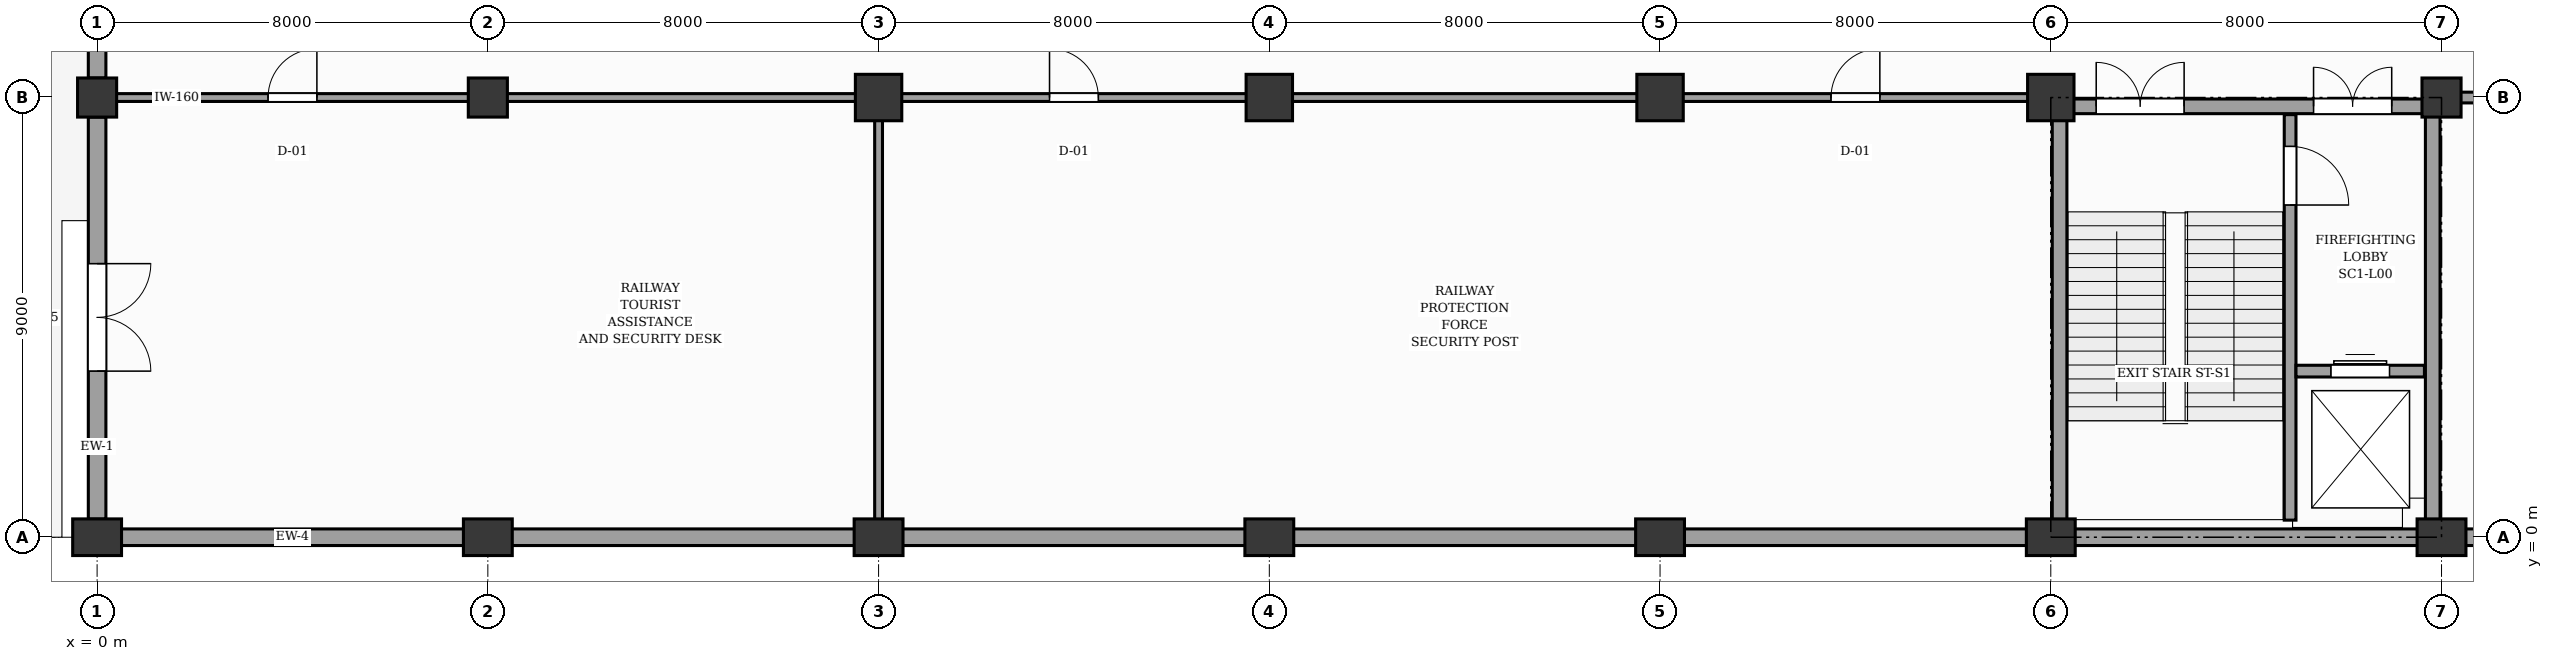
"""IFC4 building model, lengths in metres.
Left out: names, types, materials, properties, quantities, classifications, styles, units other than length and angle.
Written with IfcOpenShell. Run it as: python <this file> out.ifc"""

import sys

from ifc_helpers import new_model, si_unit, direction, frame, frame_2d, origin, origin_2d, place, context, subcontext, project, spatial, rectangle, extrude, element, fill, save


model = new_model("IFC4")
c1 = context("Model", 3, precision=1e-05, world=origin(), true_north=direction((0.0, 1.0)))
c2 = subcontext(c1, "Body", "Model", "MODEL_VIEW")
j1 = project(units=[si_unit("LENGTHUNIT", "METRE"), si_unit("PLANEANGLEUNIT", "RADIAN")], contexts=[c1])
p1 = place(None, origin())
s1 = spatial("IfcSite", under=j1, at=p1, CompositionType="ELEMENT")
p2 = place(p1, origin())
s2 = spatial("IfcBuilding", under=s1, at=p2, CompositionType="ELEMENT")
p3 = place(p2, origin())
s3 = spatial("IfcBuildingStorey", under=s2, at=p3, CompositionType="ELEMENT", Elevation=0.0)
p4 = place(p3, frame((0.0, 0.0, -0.3), z_axis=(0.0, 0.0, 1.0), x_axis=(1.0, 0.0, 0.0)))
e1 = element("IfcColumn", 1, at=p4, inside=s3, PredefinedType="PILASTER", context=c2, shape_type="SweptSolid", body=[
    extrude(rectangle(XDim=1.0, YDim=0.75, at=origin_2d()), origin(), (0.0, 0.0, 1.0), 5.1),
])
p5 = place(p3, frame((0.0, 9.0, -0.3), z_axis=(0.0, 0.0, 1.0), x_axis=(1.0, 0.0, 0.0)))
e2 = element("IfcColumn", 2, at=p5, inside=s3, PredefinedType="COLUMN", context=c2, shape_type="SweptSolid", body=[
    extrude(rectangle(XDim=0.8, YDim=0.8, at=origin_2d()), origin(), (0.0, 0.0, 1.0), 5.1),
])
p6 = place(p3, frame((8.0, 0.0, -0.3), z_axis=(0.0, 0.0, 1.0), x_axis=(1.0, 0.0, 0.0)))
e3 = element("IfcColumn", 3, at=p6, inside=s3, PredefinedType="PILASTER", context=c2, shape_type="SweptSolid", body=[
    extrude(rectangle(XDim=1.0, YDim=0.75, at=origin_2d()), origin(), (0.0, 0.0, 1.0), 5.1),
])
p7 = place(p3, frame((8.0, 9.0, -0.3), z_axis=(0.0, 0.0, 1.0), x_axis=(1.0, 0.0, 0.0)))
e4 = element("IfcColumn", 4, at=p7, inside=s3, PredefinedType="COLUMN", context=c2, shape_type="SweptSolid", body=[
    extrude(rectangle(XDim=0.8, YDim=0.8, at=origin_2d()), origin(), (0.0, 0.0, 1.0), 5.1),
])
p8 = place(p3, frame((16.0, 0.0, -0.3), z_axis=(0.0, 0.0, 1.0), x_axis=(1.0, 0.0, 0.0)))
e5 = element("IfcColumn", 5, at=p8, inside=s3, PredefinedType="PILASTER", context=c2, shape_type="SweptSolid", body=[
    extrude(rectangle(XDim=1.0, YDim=0.75, at=origin_2d()), origin(), (0.0, 0.0, 1.0), 5.1),
])
p9 = place(p3, frame((16.0, 9.0, -0.3), z_axis=(0.0, 0.0, 1.0), x_axis=(1.0, 0.0, 0.0)))
e6 = element("IfcColumn", 6, at=p9, inside=s3, PredefinedType="COLUMN", context=c2, shape_type="SweptSolid", body=[
    extrude(rectangle(XDim=0.95, YDim=0.95, at=origin_2d()), origin(), (0.0, 0.0, 1.0), 5.1),
])
p10 = place(p3, frame((24.0, 0.0, -0.3), z_axis=(0.0, 0.0, 1.0), x_axis=(1.0, 0.0, 0.0)))
e7 = element("IfcColumn", 7, at=p10, inside=s3, PredefinedType="PILASTER", context=c2, shape_type="SweptSolid", body=[
    extrude(rectangle(XDim=1.0, YDim=0.75, at=origin_2d()), origin(), (0.0, 0.0, 1.0), 5.1),
])
p11 = place(p3, frame((24.0, 9.0, -0.3), z_axis=(0.0, 0.0, 1.0), x_axis=(1.0, 0.0, 0.0)))
e8 = element("IfcColumn", 8, at=p11, inside=s3, PredefinedType="COLUMN", context=c2, shape_type="SweptSolid", body=[
    extrude(rectangle(XDim=0.95, YDim=0.95, at=origin_2d()), origin(), (0.0, 0.0, 1.0), 5.1),
])
p12 = place(p3, frame((32.0, 0.0, -0.3), z_axis=(0.0, 0.0, 1.0), x_axis=(1.0, 0.0, 0.0)))
e9 = element("IfcColumn", 9, at=p12, inside=s3, PredefinedType="PILASTER", context=c2, shape_type="SweptSolid", body=[
    extrude(rectangle(XDim=1.0, YDim=0.75, at=origin_2d()), origin(), (0.0, 0.0, 1.0), 5.1),
])
p13 = place(p3, frame((32.0, 9.0, -0.3), z_axis=(0.0, 0.0, 1.0), x_axis=(1.0, 0.0, 0.0)))
e10 = element("IfcColumn", 10, at=p13, inside=s3, PredefinedType="COLUMN", context=c2, shape_type="SweptSolid", body=[
    extrude(rectangle(XDim=0.95, YDim=0.95, at=origin_2d()), origin(), (0.0, 0.0, 1.0), 5.1),
])
p14 = place(p3, frame((40.0, 0.0, -0.3), z_axis=(0.0, 0.0, 1.0), x_axis=(1.0, 0.0, 0.0)))
e11 = element("IfcColumn", 11, at=p14, inside=s3, PredefinedType="PILASTER", context=c2, shape_type="SweptSolid", body=[
    extrude(rectangle(XDim=1.0, YDim=0.75, at=origin_2d()), origin(), (0.0, 0.0, 1.0), 5.1),
])
p15 = place(p3, frame((40.0, 9.0, -0.3), z_axis=(0.0, 0.0, 1.0), x_axis=(1.0, 0.0, 0.0)))
e12 = element("IfcColumn", 12, at=p15, inside=s3, PredefinedType="COLUMN", context=c2, shape_type="SweptSolid", body=[
    extrude(rectangle(XDim=0.95, YDim=0.95, at=origin_2d()), origin(), (0.0, 0.0, 1.0), 5.1),
])
p16 = place(p3, frame((48.0, 0.0, -0.3), z_axis=(0.0, 0.0, 1.0), x_axis=(1.0, 0.0, 0.0)))
e13 = element("IfcColumn", 13, at=p16, inside=s3, PredefinedType="PILASTER", context=c2, shape_type="SweptSolid", body=[
    extrude(rectangle(XDim=1.0, YDim=0.75, at=origin_2d()), origin(), (0.0, 0.0, 1.0), 5.1),
])
p17 = place(p3, frame((48.0, 9.0, -0.3), z_axis=(0.0, 0.0, 1.0), x_axis=(1.0, 0.0, 0.0)))
e14 = element("IfcColumn", 14, at=p17, inside=s3, PredefinedType="COLUMN", context=c2, shape_type="SweptSolid", body=[
    extrude(rectangle(XDim=0.8, YDim=0.8, at=origin_2d()), origin(), (0.0, 0.0, 1.0), 5.1),
])
for number, where, z_axis, x_axis in (
    (15, (0.4, 0.0, 0.0), (0.0, 0.0, 1.0), (1.0, 0.0, 0.0)),
    (16, (8.4, 0.0, 0.0), (0.0, 0.0, 1.0), (1.0, 0.0, 0.0)),
):
    element("IfcWall", number, at=place(p3, frame(where, z_axis=z_axis, x_axis=x_axis)), inside=s3, PredefinedType="SOLIDWALL", context=c2, shape_type="SweptSolid", body=[
        extrude(rectangle(XDim=7.2, YDim=0.34, at=frame_2d((3.6, 0.0))), origin(), (0.0, 0.0, 1.0), 3.81),
    ])
for number, where, z_axis, x_axis in (
    (17, (16.4, 0.0, 0.0), (0.0, 0.0, 1.0), (1.0, 0.0, 0.0)),
    (18, (24.4, 0.0, 0.0), (0.0, 0.0, 1.0), (1.0, 0.0, 0.0)),
    (19, (32.4, 0.0, 0.0), (0.0, 0.0, 1.0), (1.0, 0.0, 0.0)),
):
    element("IfcWall", number, at=place(p3, frame(where, z_axis=z_axis, x_axis=x_axis)), inside=s3, PredefinedType="SOLIDWALL", context=c2, shape_type="SweptSolid", body=[
        extrude(rectangle(XDim=7.2, YDim=0.34, at=frame_2d((3.6, 0.0))), origin(), (0.0, 0.0, 1.0), 3.84),
    ])
for number, where, z_axis, x_axis in (
    (20, (40.4, 0.0, 0.0), (0.0, 0.0, 1.0), (1.0, 0.0, 0.0)),
    (21, (48.4, 0.0, 0.0), (0.0, 0.0, 1.0), (1.0, 0.0, 0.0)),
):
    element("IfcWall", number, at=place(p3, frame(where, z_axis=z_axis, x_axis=x_axis)), inside=s3, PredefinedType="SOLIDWALL", context=c2, shape_type="SweptSolid", body=[
        extrude(rectangle(XDim=7.2, YDim=0.34, at=frame_2d((3.6, 0.0))), origin(), (0.0, 0.0, 1.0), 3.81),
    ])
p18 = place(p3, frame((0.0, 0.37, 0.0), z_axis=(0.0, 0.0, 1.0), x_axis=(0.0, 1.0, 0.0)))
e22 = element("IfcWall", 22, at=p18, inside=s3, PredefinedType="SOLIDWALL", context=c2, shape_type="SweptSolid", body=[
    extrude(rectangle(XDim=8.23, YDim=0.36, at=frame_2d((4.115, 0.0))), origin(), (0.0, 0.0, 1.0), 3.56),
])
p19 = place(p18, frame((3.03, 0.0, 0.0)))
e23 = element("IfcOpeningElement", 23, at=p19, cuts=e22, PredefinedType="OPENING", context=c2, shape_type="SweptSolid", body=[
    extrude(rectangle(XDim=2.2, YDim=2.3, at=frame_2d((1.1, 1.15))), frame((0.0, 0.19, 0.0), z_axis=(0.0, -1.0, 0.0), x_axis=(1.0, 0.0, 0.0)), (0.0, 0.0, 1.0), 0.38),
])
p20 = place(p3, frame((0.0, 9.4, 0.0), z_axis=(0.0, 0.0, 1.0), x_axis=(0.0, 1.0, 0.0)))
e24 = element("IfcWall", 24, at=p20, inside=s3, PredefinedType="SOLIDWALL", context=c2, shape_type="SweptSolid", body=[
    extrude(rectangle(XDim=8.2, YDim=0.36, at=frame_2d((4.1, 0.0))), origin(), (0.0, 0.0, 1.0), 3.41),
])
p21 = place(p20, frame((2.9, 0.0, 0.0)))
e25 = element("IfcOpeningElement", 25, at=p21, cuts=e24, PredefinedType="OPENING", context=c2, shape_type="SweptSolid", body=[
    extrude(rectangle(XDim=2.4, YDim=2.35, at=frame_2d((1.2, 1.175))), frame((0.0, 0.19, 0.0), z_axis=(0.0, -1.0, 0.0), x_axis=(1.0, 0.0, 0.0)), (0.0, 0.0, 1.0), 0.38),
])
p22 = place(p3, frame((44.9, 0.35, 0.0), z_axis=(0.0, 0.0, 1.0), x_axis=(0.0, 1.0, 0.0)))
e26 = element("IfcWall", 26, at=p22, inside=s3, PredefinedType="SHEAR", context=c2, shape_type="SweptSolid", body=[
    extrude(rectangle(XDim=8.3, YDim=0.24, at=frame_2d((4.15, 0.0))), origin(), (0.0, 0.0, 1.0), 4.52),
])
p23 = place(p22, frame((6.45, 0.0, 0.0)))
e27 = element("IfcOpeningElement", 27, at=p23, cuts=e26, PredefinedType="OPENING", context=c2, shape_type="SweptSolid", body=[
    extrude(rectangle(XDim=1.2, YDim=2.15, at=frame_2d((0.6, 1.075))), frame((0.0, 0.13, 0.0), z_axis=(0.0, -1.0, 0.0), x_axis=(1.0, 0.0, 0.0)), (0.0, 0.0, 1.0), 0.26),
])
p24 = place(p3, frame((45.02, 3.4, 0.0), z_axis=(0.0, 0.0, 1.0), x_axis=(1.0, 0.0, 0.0)))
e28 = element("IfcWall", 28, at=p24, inside=s3, PredefinedType="SHEAR", context=c2, shape_type="SweptSolid", body=[
    extrude(rectangle(XDim=2.63, YDim=0.24, at=frame_2d((1.315, 0.0))), origin(), (0.0, 0.0, 1.0), 4.52),
])
p25 = place(p24, frame((0.715, 0.0, 0.0)))
e29 = element("IfcOpeningElement", 29, at=p25, cuts=e28, PredefinedType="OPENING", context=c2, shape_type="SweptSolid", body=[
    extrude(rectangle(XDim=1.2, YDim=2.15, at=frame_2d((0.6, 1.075))), frame((0.0, 0.13, 0.0), z_axis=(0.0, -1.0, 0.0), x_axis=(1.0, 0.0, 0.0)), (0.0, 0.0, 1.0), 0.26),
])
for number, where, z_axis, x_axis in (
    (30, (40.18, 0.18, 0.0), (0.0, 0.0, 1.0), (0.0, 1.0, 0.0)),
    (31, (47.82, 0.18, 0.0), (0.0, 0.0, 1.0), (0.0, 1.0, 0.0)),
):
    element("IfcWall", number, at=place(p3, frame(where, z_axis=z_axis, x_axis=x_axis)), inside=s3, PredefinedType="SHEAR", context=c2, shape_type="SweptSolid", body=[
        extrude(rectangle(XDim=8.64, YDim=0.3, at=frame_2d((4.32, 0.0))), origin(), (0.0, 0.0, 1.0), 4.52),
    ])
p26 = place(p3, frame((40.03, 8.82, 0.0), z_axis=(0.0, 0.0, 1.0), x_axis=(1.0, 0.0, 0.0)))
e32 = element("IfcWall", 32, at=p26, inside=s3, PredefinedType="SHEAR", context=c2, shape_type="SweptSolid", body=[
    extrude(rectangle(XDim=7.94, YDim=0.3, at=frame_2d((3.97, 0.0))), origin(), (0.0, 0.0, 1.0), 4.52),
])
p27 = place(p26, frame((5.35, 0.0, 0.0)))
e33 = element("IfcOpeningElement", 33, at=p27, cuts=e32, PredefinedType="OPENING", context=c2, shape_type="SweptSolid", body=[
    extrude(rectangle(XDim=1.6, YDim=2.15, at=frame_2d((0.8, 1.075))), frame((0.0, 0.16, 0.0), z_axis=(0.0, -1.0, 0.0), x_axis=(1.0, 0.0, 0.0)), (0.0, 0.0, 1.0), 0.32),
])
p28 = place(p26, frame((0.9, 0.0, 0.0)))
e34 = element("IfcOpeningElement", 34, at=p28, cuts=e32, PredefinedType="OPENING", context=c2, shape_type="SweptSolid", body=[
    extrude(rectangle(XDim=1.8, YDim=2.2, at=frame_2d((0.9, 1.1))), frame((0.0, 0.16, 0.0), z_axis=(0.0, -1.0, 0.0), x_axis=(1.0, 0.0, 0.0)), (0.0, 0.0, 1.0), 0.32),
])
p29 = place(p3, frame((0.3, 9.0, 0.0), z_axis=(0.0, 0.0, 1.0), x_axis=(1.0, 0.0, 0.0)))
e35 = element("IfcWall", 35, at=p29, inside=s3, PredefinedType="PARTITIONING", context=c2, shape_type="SweptSolid", body=[
    extrude(rectangle(XDim=7.4, YDim=0.16, at=frame_2d((3.7, 0.0))), origin(), (0.0, 0.0, 1.0), 3.56),
])
p30 = place(p29, frame((3.2, 0.0, 0.0)))
e36 = element("IfcOpeningElement", 36, at=p30, cuts=e35, PredefinedType="OPENING", context=c2, shape_type="SweptSolid", body=[
    extrude(rectangle(XDim=1.0, YDim=2.1, at=frame_2d((0.5, 1.05))), frame((0.0, 0.09, 0.0), z_axis=(0.0, -1.0, 0.0), x_axis=(1.0, 0.0, 0.0)), (0.0, 0.0, 1.0), 0.18),
])
p31 = place(p3, frame((8.3, 9.0, 0.0), z_axis=(0.0, 0.0, 1.0), x_axis=(1.0, 0.0, 0.0)))
e37 = element("IfcWall", 37, at=p31, inside=s3, PredefinedType="PARTITIONING", context=c2, shape_type="SweptSolid", body=[
    extrude(rectangle(XDim=7.4, YDim=0.16, at=frame_2d((3.7, 0.0))), origin(), (0.0, 0.0, 1.0), 3.56),
])
p32 = place(p3, frame((16.0, 0.3, 0.0), z_axis=(0.0, 0.0, 1.0), x_axis=(0.0, 1.0, 0.0)))
e38 = element("IfcWall", 38, at=p32, inside=s3, PredefinedType="PARTITIONING", context=c2, shape_type="SweptSolid", body=[
    extrude(rectangle(XDim=8.4, YDim=0.16, at=frame_2d((4.2, 0.0))), origin(), (0.0, 0.0, 1.0), 3.56),
])
p33 = place(p3, frame((16.3, 9.0, 0.0), z_axis=(0.0, 0.0, 1.0), x_axis=(1.0, 0.0, 0.0)))
e39 = element("IfcWall", 39, at=p33, inside=s3, PredefinedType="PARTITIONING", context=c2, shape_type="SweptSolid", body=[
    extrude(rectangle(XDim=7.4, YDim=0.16, at=frame_2d((3.7, 0.0))), origin(), (0.0, 0.0, 1.0), 3.56),
])
p34 = place(p33, frame((3.2, 0.0, 0.0)))
e40 = element("IfcOpeningElement", 40, at=p34, cuts=e39, PredefinedType="OPENING", context=c2, shape_type="SweptSolid", body=[
    extrude(rectangle(XDim=1.0, YDim=2.1, at=frame_2d((0.5, 1.05))), frame((0.0, 0.09, 0.0), z_axis=(0.0, -1.0, 0.0), x_axis=(1.0, 0.0, 0.0)), (0.0, 0.0, 1.0), 0.18),
])
p35 = place(p3, frame((24.3, 9.0, 0.0), z_axis=(0.0, 0.0, 1.0), x_axis=(1.0, 0.0, 0.0)))
e41 = element("IfcWall", 41, at=p35, inside=s3, PredefinedType="PARTITIONING", context=c2, shape_type="SweptSolid", body=[
    extrude(rectangle(XDim=7.4, YDim=0.16, at=frame_2d((3.7, 0.0))), origin(), (0.0, 0.0, 1.0), 3.56),
])
p36 = place(p3, frame((32.3, 9.0, 0.0), z_axis=(0.0, 0.0, 1.0), x_axis=(1.0, 0.0, 0.0)))
e42 = element("IfcWall", 42, at=p36, inside=s3, PredefinedType="PARTITIONING", context=c2, shape_type="SweptSolid", body=[
    extrude(rectangle(XDim=7.4, YDim=0.16, at=frame_2d((3.7, 0.0))), origin(), (0.0, 0.0, 1.0), 3.56),
])
p37 = place(p36, frame((3.2, 0.0, 0.0)))
e43 = element("IfcOpeningElement", 43, at=p37, cuts=e42, PredefinedType="OPENING", context=c2, shape_type="SweptSolid", body=[
    extrude(rectangle(XDim=1.0, YDim=2.1, at=frame_2d((0.5, 1.05))), frame((0.0, 0.09, 0.0), z_axis=(0.0, -1.0, 0.0), x_axis=(1.0, 0.0, 0.0)), (0.0, 0.0, 1.0), 0.18),
])
p38 = place(p3, frame((48.3, 9.0, 0.0), z_axis=(0.0, 0.0, 1.0), x_axis=(1.0, 0.0, 0.0)))
e44 = element("IfcWall", 44, at=p38, inside=s3, PredefinedType="SOLIDWALL", context=c2, shape_type="SweptSolid", body=[
    extrude(rectangle(XDim=7.4, YDim=0.22, at=frame_2d((3.7, 0.0))), origin(), (0.0, 0.0, 1.0), 3.56),
])
p39 = place(p38, frame((2.95, 0.0, 0.0)))
e45 = element("IfcOpeningElement", 45, at=p39, cuts=e44, PredefinedType="OPENING", context=c2, shape_type="SweptSolid", body=[
    extrude(rectangle(XDim=1.5, YDim=2.2, at=frame_2d((0.75, 1.1))), frame((0.0, 0.12, 0.0), z_axis=(0.0, -1.0, 0.0), x_axis=(1.0, 0.0, 0.0)), (0.0, 0.0, 1.0), 0.24),
])
p40 = place(p19, frame((2.2, 0.0, 0.0), z_axis=(0.0, 0.0, 1.0), x_axis=(-1.0, 0.0, 0.0)))
e46 = element("IfcDoor", 46, at=p40, inside=s3, OperationType="DOUBLE_DOOR_SINGLE_SWING", PredefinedType="DOOR", context=c2, shape_type="SweptSolid", body=[
    extrude(rectangle(XDim=2.2, YDim=2.3, at=frame_2d((1.1, 1.15))), frame((0.0, 0.025, 0.0), z_axis=(0.0, -1.0, 0.0), x_axis=(1.0, 0.0, 0.0)), (0.0, 0.0, 1.0), 0.05),
])
fill(e23, e46)
p41 = place(p23, frame((1.2, 0.0, 0.0), z_axis=(0.0, 0.0, 1.0), x_axis=(-1.0, 0.0, 0.0)))
e47 = element("IfcDoor", 47, at=p41, inside=s3, OperationType="SINGLE_SWING_LEFT", PredefinedType="DOOR", context=c2, shape_type="SweptSolid", body=[
    extrude(rectangle(XDim=1.2, YDim=2.15, at=frame_2d((0.6, 1.075))), frame((0.0, 0.025, 0.0), z_axis=(0.0, -1.0, 0.0), x_axis=(1.0, 0.0, 0.0)), (0.0, 0.0, 1.0), 0.05),
])
fill(e27, e47)
p42 = place(p25, origin())
e48 = element("IfcDoor", 48, at=p42, inside=s3, OperationType="DOUBLE_DOOR_SLIDING", PredefinedType="DOOR", context=c2, shape_type="SweptSolid", body=[
    extrude(rectangle(XDim=1.2, YDim=2.15, at=frame_2d((0.6, 1.075))), frame((0.0, 0.025, 0.0), z_axis=(0.0, -1.0, 0.0), x_axis=(1.0, 0.0, 0.0)), (0.0, 0.0, 1.0), 0.05),
])
fill(e29, e48)
p43 = place(p27, origin())
e49 = element("IfcDoor", 49, at=p43, inside=s3, OperationType="DOUBLE_DOOR_SINGLE_SWING", PredefinedType="DOOR", context=c2, shape_type="SweptSolid", body=[
    extrude(rectangle(XDim=1.6, YDim=2.15, at=frame_2d((0.8, 1.075))), frame((0.0, 0.025, 0.0), z_axis=(0.0, -1.0, 0.0), x_axis=(1.0, 0.0, 0.0)), (0.0, 0.0, 1.0), 0.05),
])
fill(e33, e49)
p44 = place(p28, origin())
e50 = element("IfcDoor", 50, at=p44, inside=s3, OperationType="DOUBLE_DOOR_SINGLE_SWING", PredefinedType="DOOR", context=c2, shape_type="SweptSolid", body=[
    extrude(rectangle(XDim=1.8, YDim=2.2, at=frame_2d((0.9, 1.1))), frame((0.0, 0.025, 0.0), z_axis=(0.0, -1.0, 0.0), x_axis=(1.0, 0.0, 0.0)), (0.0, 0.0, 1.0), 0.05),
])
fill(e34, e50)
p45 = place(p30, origin())
e51 = element("IfcDoor", 51, at=p45, inside=s3, OperationType="SINGLE_SWING_RIGHT", PredefinedType="DOOR", context=c2, shape_type="SweptSolid", body=[
    extrude(rectangle(XDim=1.0, YDim=2.1, at=frame_2d((0.5, 1.05))), frame((0.0, 0.025, 0.0), z_axis=(0.0, -1.0, 0.0), x_axis=(1.0, 0.0, 0.0)), (0.0, 0.0, 1.0), 0.05),
])
fill(e36, e51)
p46 = place(p34, origin())
e52 = element("IfcDoor", 52, at=p46, inside=s3, OperationType="SINGLE_SWING_LEFT", PredefinedType="DOOR", context=c2, shape_type="SweptSolid", body=[
    extrude(rectangle(XDim=1.0, YDim=2.1, at=frame_2d((0.5, 1.05))), frame((0.0, 0.025, 0.0), z_axis=(0.0, -1.0, 0.0), x_axis=(1.0, 0.0, 0.0)), (0.0, 0.0, 1.0), 0.05),
])
fill(e40, e52)
p47 = place(p37, origin())
e53 = element("IfcDoor", 53, at=p47, inside=s3, OperationType="SINGLE_SWING_RIGHT", PredefinedType="DOOR", context=c2, shape_type="SweptSolid", body=[
    extrude(rectangle(XDim=1.0, YDim=2.1, at=frame_2d((0.5, 1.05))), frame((0.0, 0.025, 0.0), z_axis=(0.0, -1.0, 0.0), x_axis=(1.0, 0.0, 0.0)), (0.0, 0.0, 1.0), 0.05),
])
fill(e43, e53)
save(model, sys.argv[1])
